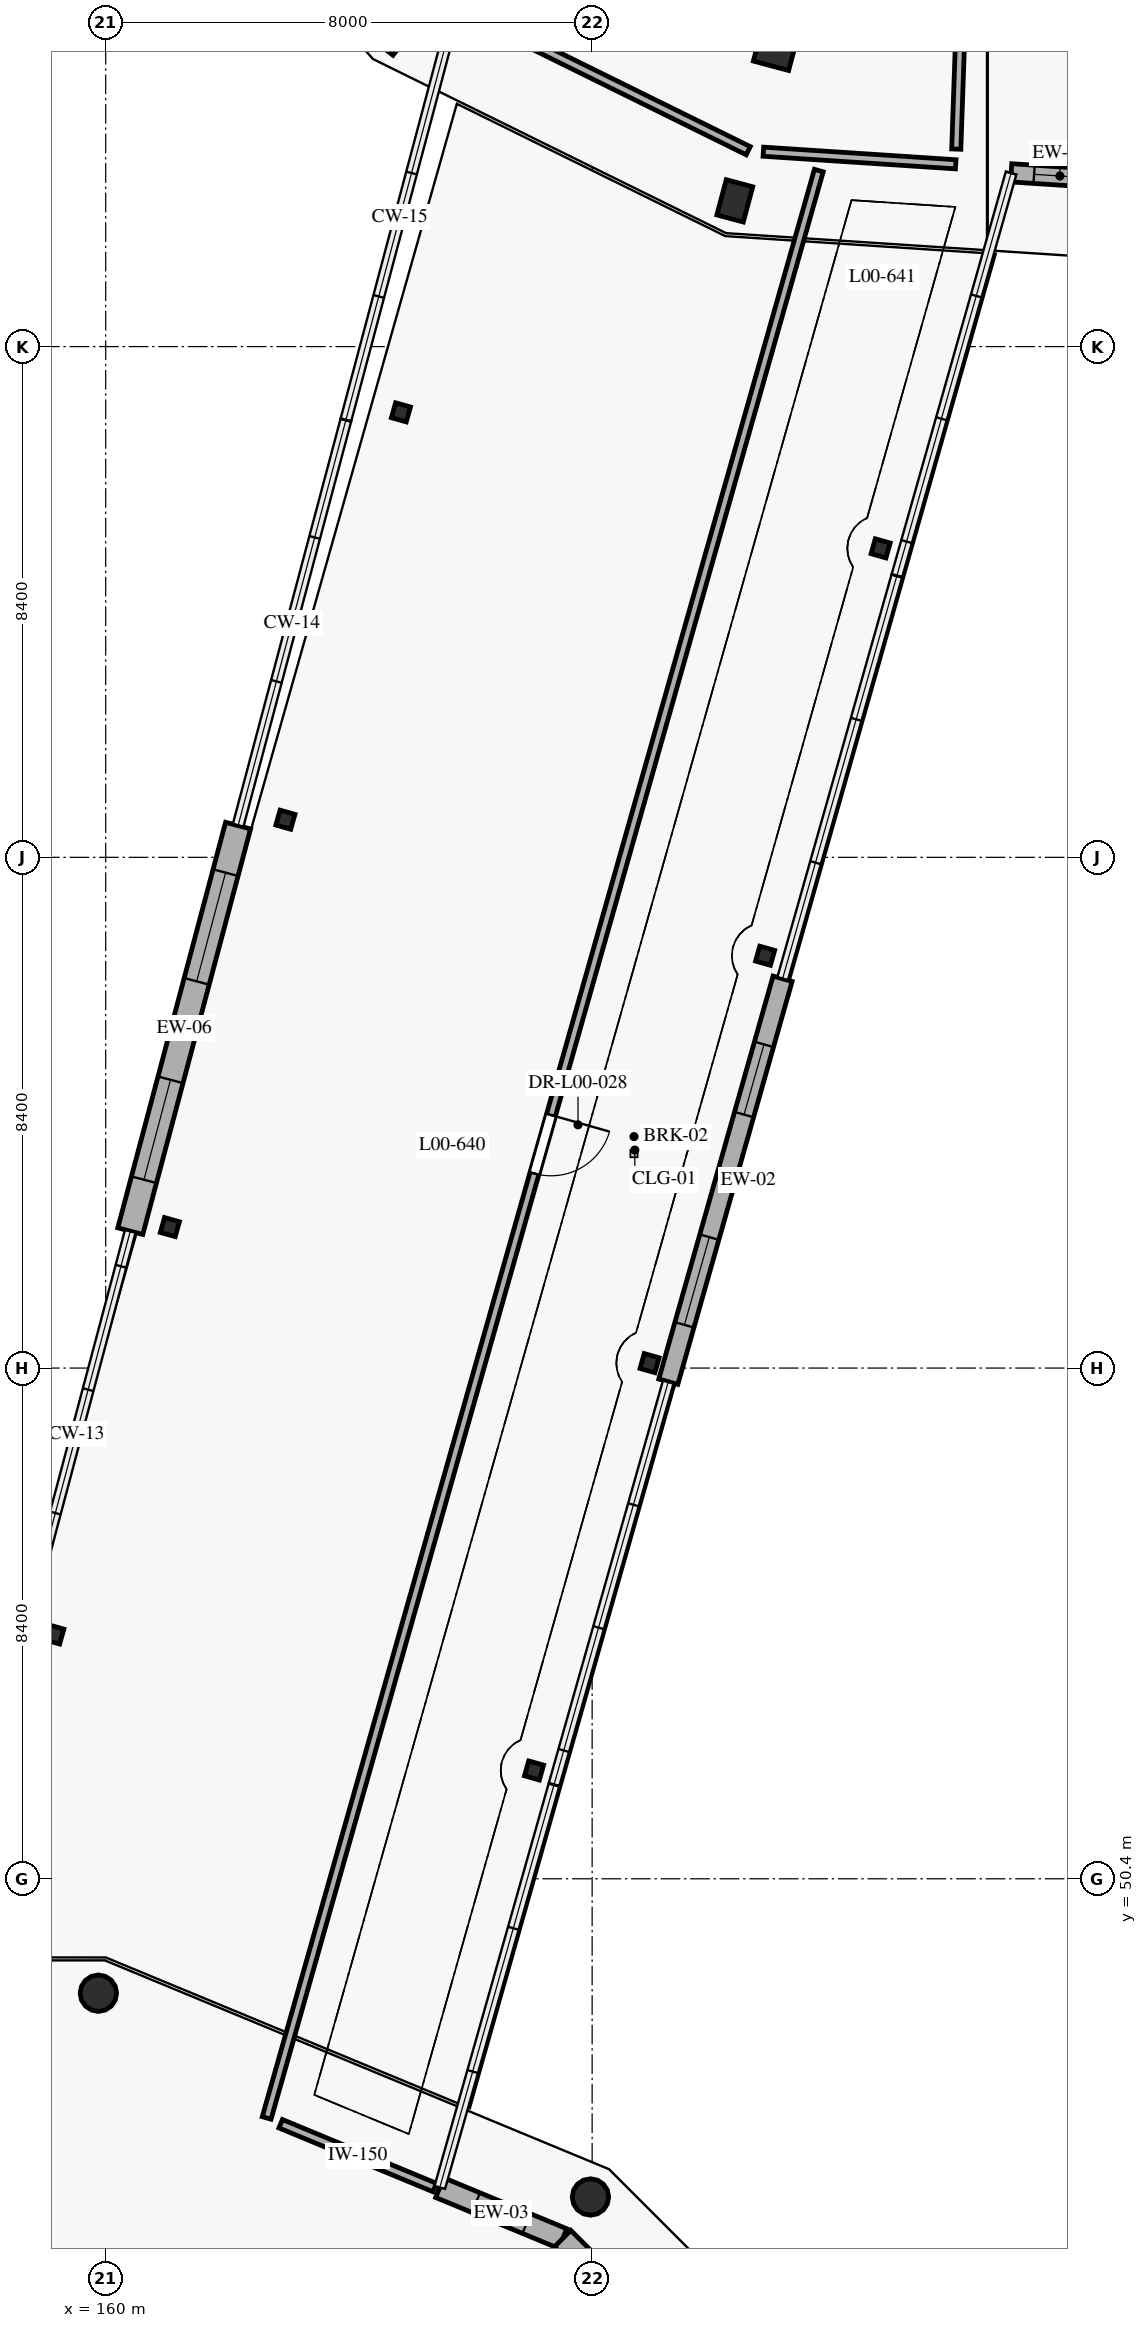
"""IFC4 building model, lengths in metres.
Left out: names, types, materials, properties, quantities, classifications, styles, units other than length and angle.
Written with IfcOpenShell. Run it as: python <this file> out.ifc"""

import sys

from ifc_helpers import new_model, si_unit, direction, frame, frame_2d, origin, origin_2d, place, context, subcontext, project, spatial, rectangle, circle, i_section, extrude, element, fill, save


model = new_model("IFC4")
c1 = context("Model", 3, precision=1e-05, world=origin(), true_north=direction((0.0, 1.0)))
c2 = subcontext(c1, "Body", "Model", "MODEL_VIEW")
j1 = project(units=[si_unit("LENGTHUNIT", "METRE"), si_unit("PLANEANGLEUNIT", "RADIAN")], contexts=[c1])
p1 = place(None, origin())
s1 = spatial("IfcSite", under=j1, at=p1, CompositionType="ELEMENT")
p2 = place(p1, origin())
s2 = spatial("IfcBuilding", under=s1, at=p2, CompositionType="ELEMENT")
p3 = place(p2, origin())
s3 = spatial("IfcBuildingStorey", under=s2, at=p3, CompositionType="ELEMENT", Elevation=0.0)
for number, where, z_axis, x_axis in (
    (1, (167.973, 45.167, 0.0), (0.0, 0.0, 1.0), (-0.831, 0.556, 0.0)),
    (2, (159.88, 48.519, 0.0), (0.0, 0.0, 1.0), (-0.981, 0.195, 0.0)),
):
    element("IfcColumn", number, at=place(p3, frame(where, z_axis=z_axis, x_axis=x_axis)), inside=s3, PredefinedType="COLUMN", context=c2, shape_type="SweptSolid", body=[
        extrude(circle(Radius=0.3, at=origin_2d()), origin(), (0.0, 0.0, 1.0), 4.2),
    ])
for number, where, z_axis, x_axis in (
    (3, (164.729, 80.767, 0.0), (0.0, 0.0, 1.0), (0.793, -0.609, 0.0)),
    (4, (170.346, 77.997, 0.0), (0.0, 0.0, 1.0), (0.966, -0.259, 0.0)),
):
    element("IfcColumn", number, at=place(p3, frame(where, z_axis=z_axis, x_axis=x_axis)), inside=s3, PredefinedType="PILASTER", context=c2, shape_type="SweptSolid", body=[
        extrude(rectangle(XDim=0.45, YDim=0.6, at=origin_2d()), origin(), (0.0, 0.0, 1.0), 4.2),
    ])
p4 = place(p3, frame((171.019, 80.508, 0.0), z_axis=(0.0, 0.0, 1.0), x_axis=(0.965925826289, -0.258819045103, 0.0)))
e5 = element("IfcColumn", 5, at=p4, inside=s3, PredefinedType="COLUMN", context=c2, shape_type="SweptSolid", body=[
    extrude(rectangle(XDim=0.6, YDim=0.6, at=origin_2d()), origin(), (0.0, 0.0, 1.0), 4.2),
])
for number, where, z_axis, x_axis in (
    (6, (159.156, 54.419, 0.0), (0.0, 0.0, 1.0), (0.273, 0.962, 0.0)),
    (7, (167.044, 52.181, 0.0), (0.0, 0.0, 1.0), (0.273, 0.962, 0.0)),
    (8, (161.055, 61.119, 0.0), (0.0, 0.0, 1.0), (0.273, 0.962, 0.0)),
    (9, (168.945, 58.881, 0.0), (0.0, 0.0, 1.0), (0.273, 0.962, 0.0)),
    (10, (162.956, 67.819, 0.0), (0.0, 0.0, 1.0), (0.273, 0.962, 0.0)),
    (11, (170.844, 65.581, 0.0), (0.0, 0.0, 1.0), (0.273, 0.962, 0.0)),
    (12, (164.855, 74.519, 0.0), (0.0, 0.0, 1.0), (0.273, 0.962, 0.0)),
    (13, (172.744, 72.281, 0.0), (0.0, 0.0, 1.0), (0.273, 0.962, 0.0)),
):
    element("IfcColumn", number, at=place(p3, frame(where, z_axis=z_axis, x_axis=x_axis)), inside=s3, PredefinedType="COLUMN", context=c2, shape_type="SweptSolid", body=[
        extrude(i_section(OverallWidth=0.255, OverallDepth=0.254, WebThickness=0.009, FlangeThickness=0.014, FilletRadius=0.013, at=origin_2d()), origin(), (0.0, 0.0, 1.0), 4.2),
    ])
p5 = place(p3, frame((176.494, 78.353, 0.0), z_axis=(0.0, 0.0, 1.0), x_axis=(-0.997862476256, 0.06534889808, 0.0)))
e14 = element("IfcWall", 14, at=p5, inside=s3, PredefinedType="SOLIDWALL", context=c2, shape_type="SweptSolid", body=[
    extrude(rectangle(XDim=1.606, YDim=0.3, at=frame_2d((0.803, 0.0))), origin(), (0.0, 0.0, 1.0), 3.94),
])
p6 = place(p5, frame((0.378, 0.0, 0.85)))
e15 = element("IfcOpeningElement", 15, at=p6, cuts=e14, PredefinedType="OPENING", context=c2, shape_type="SweptSolid", body=[
    extrude(rectangle(XDim=0.85, YDim=1.4, at=frame_2d((0.425, 0.7))), frame((0.0, 0.16, 0.0), z_axis=(0.0, -1.0, 0.0), x_axis=(1.0, 0.0, 0.0)), (0.0, 0.0, 1.0), 0.32),
])
p7 = place(p3, frame((171.132, 65.203, 0.0), z_axis=(0.0, 0.0, 1.0), x_axis=(-0.27282018356, -0.962065043249, 0.0)))
e16 = element("IfcWall", 16, at=p7, inside=s3, PredefinedType="SOLIDWALL", context=c2, shape_type="SweptSolid", body=[
    extrude(rectangle(XDim=6.889, YDim=0.325, at=frame_2d((3.444, 0.0))), origin(), (0.0, 0.0, 1.0), 3.94),
])
p8 = place(p7, frame((1.122, 0.0, 0.85)))
e17 = element("IfcOpeningElement", 17, at=p8, cuts=e16, PredefinedType="OPENING", context=c2, shape_type="SweptSolid", body=[
    extrude(rectangle(XDim=1.2, YDim=1.15, at=frame_2d((0.6, 0.575))), frame((0.0, 0.172, 0.0), z_axis=(0.0, -1.0, 0.0), x_axis=(1.0, 0.0, 0.0)), (0.0, 0.0, 1.0), 0.345),
])
p9 = place(p7, frame((4.417, 0.0, 0.85)))
e18 = element("IfcOpeningElement", 18, at=p9, cuts=e16, PredefinedType="OPENING", context=c2, shape_type="SweptSolid", body=[
    extrude(rectangle(XDim=1.5, YDim=1.15, at=frame_2d((0.75, 0.575))), frame((0.0, 0.172, 0.0), z_axis=(0.0, -1.0, 0.0), x_axis=(1.0, 0.0, 0.0)), (0.0, 0.0, 1.0), 0.345),
])
p10 = place(p3, frame((165.494, 45.32, 0.0), z_axis=(0.0, 0.0, 1.0), x_axis=(0.923883575944, -0.382673670509, 0.0)))
e19 = element("IfcWall", 19, at=p10, inside=s3, PredefinedType="SOLIDWALL", context=c2, shape_type="SweptSolid", body=[
    extrude(rectangle(XDim=2.188, YDim=0.35, at=frame_2d((1.094, 0.0))), origin(), (0.0, 0.0, 1.0), 3.94),
])
p11 = place(p10, frame((0.644, 0.0, 0.85)))
e20 = element("IfcOpeningElement", 20, at=p11, cuts=e19, PredefinedType="OPENING", context=c2, shape_type="SweptSolid", body=[
    extrude(rectangle(XDim=0.9, YDim=1.6, at=frame_2d((0.45, 0.8))), frame((0.0, 0.185, 0.0), z_axis=(0.0, -1.0, 0.0), x_axis=(1.0, 0.0, 0.0)), (0.0, 0.0, 1.0), 0.37),
])
p12 = place(p3, frame((167.516, 44.483, 0.0), z_axis=(0.0, 0.0, 1.0), x_axis=(0.707106781187, -0.707106781187, 0.0)))
e21 = element("IfcWall", 21, at=p12, inside=s3, PredefinedType="SOLIDWALL", context=c2, shape_type="SweptSolid", body=[
    extrude(rectangle(XDim=8.439, YDim=0.38, at=frame_2d((4.219, 0.0))), origin(), (0.0, 0.0, 1.0), 3.94),
])
p13 = place(p12, frame((3.26, 0.0, 0.0)))
e22 = element("IfcOpeningElement", 22, at=p13, cuts=e21, PredefinedType="OPENING", context=c2, shape_type="SweptSolid", body=[
    extrude(rectangle(XDim=1.92, YDim=2.18, at=frame_2d((0.96, 1.09))), frame((0.0, 0.2, 0.0), z_axis=(0.0, -1.0, 0.0), x_axis=(1.0, 0.0, 0.0)), (0.0, 0.0, 1.0), 0.4),
])
p14 = place(p3, frame((160.405, 61.052, 0.0), z_axis=(0.0, 0.0, 1.0), x_axis=(0.256858914513, 0.966448911239, 0.0)))
e23 = element("IfcWall", 23, at=p14, inside=s3, PredefinedType="SOLIDWALL", context=c2, shape_type="SweptSolid", body=[
    extrude(rectangle(XDim=6.901, YDim=0.425, at=frame_2d((3.451, 0.0))), origin(), (0.0, 0.0, 1.0), 3.94),
])
p15 = place(p14, frame((0.875, 0.0, 0.85)))
e24 = element("IfcOpeningElement", 24, at=p15, cuts=e23, PredefinedType="OPENING", context=c2, shape_type="SweptSolid", body=[
    extrude(rectangle(XDim=1.7, YDim=1.4, at=frame_2d((0.85, 0.7))), frame((0.0, 0.222, 0.0), z_axis=(0.0, -1.0, 0.0), x_axis=(1.0, 0.0, 0.0)), (0.0, 0.0, 1.0), 0.445),
])
p16 = place(p14, frame((4.251, 0.0, 0.85)))
e25 = element("IfcOpeningElement", 25, at=p16, cuts=e23, PredefinedType="OPENING", context=c2, shape_type="SweptSolid", body=[
    extrude(rectangle(XDim=1.85, YDim=1.4, at=frame_2d((0.925, 0.7))), frame((0.0, 0.222, 0.0), z_axis=(0.0, -1.0, 0.0), x_axis=(1.0, 0.0, 0.0)), (0.0, 0.0, 1.0), 0.445),
])
p17 = place(p3, frame((173.574, 86.21, 0.0), z_axis=(0.0, 0.0, 1.0), x_axis=(0.469691859779, -0.882830423613, 0.0)))
e26 = element("IfcWall", 26, at=p17, inside=s3, PredefinedType="PARTITIONING", context=c2, shape_type="SweptSolid", body=[
    extrude(rectangle(XDim=8.314, YDim=0.185, at=frame_2d((4.157, 0.0))), origin(), (0.0, 0.0, 1.0), 3.915),
])
p18 = place(p3, frame((166.286, 80.933, 0.0), z_axis=(0.0, 0.0, 1.0), x_axis=(0.896868647231, -0.442296992544, 0.0)))
e27 = element("IfcWall", 27, at=p18, inside=s3, PredefinedType="PARTITIONING", context=c2, shape_type="SweptSolid", body=[
    extrude(rectangle(XDim=4.773, YDim=0.15, at=frame_2d((2.387, 0.0))), origin(), (0.0, 0.0, 1.0), 3.915),
])
p19 = place(p3, frame((170.816, 78.805, 0.0), z_axis=(0.0, 0.0, 1.0), x_axis=(0.997854805098, -0.065465929634, 0.0)))
e28 = element("IfcWall", 28, at=p19, inside=s3, PredefinedType="PARTITIONING", context=c2, shape_type="SweptSolid", body=[
    extrude(rectangle(XDim=3.17, YDim=0.15, at=frame_2d((1.585, 0.0))), origin(), (0.0, 0.0, 1.0), 3.915),
])
p20 = place(p3, frame((173.988, 78.848, 0.0), z_axis=(0.0, 0.0, 1.0), x_axis=(0.034928377701, 0.999389818055, 0.0)))
e29 = element("IfcWall", 29, at=p20, inside=s3, PredefinedType="PARTITIONING", context=c2, shape_type="SweptSolid", body=[
    extrude(rectangle(XDim=5.683, YDim=0.15, at=frame_2d((2.841, 0.0))), origin(), (0.0, 0.0, 1.0), 3.915),
])
p21 = place(p3, frame((171.728, 78.495, 0.0), z_axis=(0.0, 0.0, 1.0), x_axis=(-0.27275916011, -0.962082346047, 0.0)))
e30 = element("IfcWall", 30, at=p21, inside=s3, PredefinedType="PARTITIONING", context=c2, shape_type="SweptSolid", body=[
    extrude(rectangle(XDim=33.291, YDim=0.15, at=frame_2d((16.645, 0.0))), origin(), (0.0, 0.0, 1.0), 3.915),
])
p22 = place(p21, frame((16.145, 0.0, 0.0)))
e31 = element("IfcOpeningElement", 31, at=p22, cuts=e30, PredefinedType="OPENING", context=c2, shape_type="SweptSolid", body=[
    extrude(rectangle(XDim=1.0, YDim=2.1, at=frame_2d((0.5, 1.05))), frame((0.0, 0.085, 0.0), z_axis=(0.0, -1.0, 0.0), x_axis=(1.0, 0.0, 0.0)), (0.0, 0.0, 1.0), 0.17),
])
p23 = place(p3, frame((162.878, 46.371, 0.0), z_axis=(0.0, 0.0, 1.0), x_axis=(0.923881153935, -0.382679517877, 0.0)))
e32 = element("IfcWall", 32, at=p23, inside=s3, PredefinedType="PARTITIONING", context=c2, shape_type="SweptSolid", body=[
    extrude(rectangle(XDim=2.741, YDim=0.15, at=frame_2d((1.371, 0.0))), origin(), (0.0, 0.0, 1.0), 3.915),
])
p24 = place(p6, origin())
e33 = element("IfcWindow", 33, at=p24, inside=s3, PartitioningType="SINGLE_PANEL", PredefinedType="WINDOW", context=c2, shape_type="SweptSolid", body=[
    extrude(rectangle(XDim=0.85, YDim=1.4, at=frame_2d((0.425, 0.7))), frame((0.0, 0.03, 0.0), z_axis=(0.0, -1.0, 0.0), x_axis=(1.0, 0.0, 0.0)), (0.0, 0.0, 1.0), 0.06),
])
fill(e15, e33)
p25 = place(p8, origin())
e34 = element("IfcWindow", 34, at=p25, inside=s3, PartitioningType="SINGLE_PANEL", PredefinedType="WINDOW", context=c2, shape_type="SweptSolid", body=[
    extrude(rectangle(XDim=1.2, YDim=1.15, at=frame_2d((0.6, 0.575))), frame((0.0, 0.03, 0.0), z_axis=(0.0, -1.0, 0.0), x_axis=(1.0, 0.0, 0.0)), (0.0, 0.0, 1.0), 0.06),
])
fill(e17, e34)
p26 = place(p9, origin())
e35 = element("IfcWindow", 35, at=p26, inside=s3, PartitioningType="SINGLE_PANEL", PredefinedType="WINDOW", context=c2, shape_type="SweptSolid", body=[
    extrude(rectangle(XDim=1.5, YDim=1.15, at=frame_2d((0.75, 0.575))), frame((0.0, 0.03, 0.0), z_axis=(0.0, -1.0, 0.0), x_axis=(1.0, 0.0, 0.0)), (0.0, 0.0, 1.0), 0.06),
])
fill(e18, e35)
p27 = place(p11, origin())
e36 = element("IfcWindow", 36, at=p27, inside=s3, PartitioningType="SINGLE_PANEL", PredefinedType="WINDOW", context=c2, shape_type="SweptSolid", body=[
    extrude(rectangle(XDim=0.9, YDim=1.6, at=frame_2d((0.45, 0.8))), frame((0.0, 0.03, 0.0), z_axis=(0.0, -1.0, 0.0), x_axis=(1.0, 0.0, 0.0)), (0.0, 0.0, 1.0), 0.06),
])
fill(e20, e36)
p28 = place(p15, origin())
e37 = element("IfcWindow", 37, at=p28, inside=s3, PartitioningType="SINGLE_PANEL", PredefinedType="WINDOW", context=c2, shape_type="SweptSolid", body=[
    extrude(rectangle(XDim=1.7, YDim=1.4, at=frame_2d((0.85, 0.7))), frame((0.0, 0.03, 0.0), z_axis=(0.0, -1.0, 0.0), x_axis=(1.0, 0.0, 0.0)), (0.0, 0.0, 1.0), 0.06),
])
fill(e24, e37)
p29 = place(p16, origin())
e38 = element("IfcWindow", 38, at=p29, inside=s3, PartitioningType="SINGLE_PANEL", PredefinedType="WINDOW", context=c2, shape_type="SweptSolid", body=[
    extrude(rectangle(XDim=1.85, YDim=1.4, at=frame_2d((0.925, 0.7))), frame((0.0, 0.03, 0.0), z_axis=(0.0, -1.0, 0.0), x_axis=(1.0, 0.0, 0.0)), (0.0, 0.0, 1.0), 0.06),
])
fill(e25, e38)
p30 = place(p22, origin())
e39 = element("IfcDoor", 39, at=p30, inside=s3, OperationType="SINGLE_SWING_LEFT", PredefinedType="DOOR", context=c2, shape_type="SweptSolid", body=[
    extrude(rectangle(XDim=1.0, YDim=2.1, at=frame_2d((0.5, 1.05))), frame((0.0, 0.025, 0.0), z_axis=(0.0, -1.0, 0.0), x_axis=(1.0, 0.0, 0.0)), (0.0, 0.0, 1.0), 0.05),
])
fill(e31, e39)
save(model, sys.argv[1])
